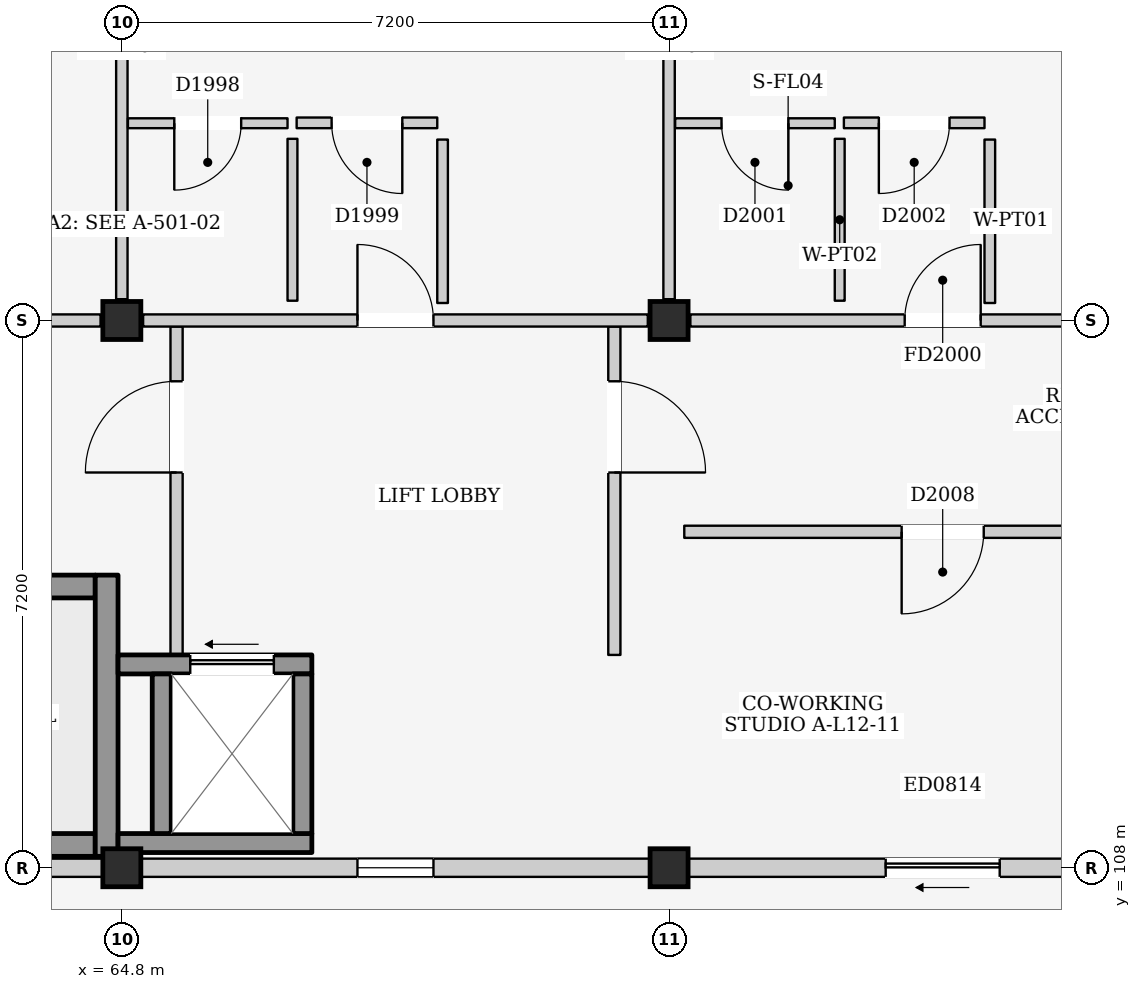
"""IFC4 building model, lengths in metres.
Left out: names, types, materials, properties, quantities, classifications, styles, units other than length and angle.
Written with IfcOpenShell. Run it as: python <this file> out.ifc"""

import sys

from ifc_helpers import new_model, si_unit, direction, frame, frame_2d, origin, origin_2d, place, context, subcontext, project, spatial, rectangle, extrude, element, fill, save


model = new_model("IFC4")
c1 = context("Model", 3, precision=1e-05, world=origin(), true_north=direction((0.0, 1.0)))
c2 = subcontext(c1, "Body", "Model", "MODEL_VIEW")
j1 = project(units=[si_unit("LENGTHUNIT", "METRE"), si_unit("PLANEANGLEUNIT", "RADIAN")], contexts=[c1])
p1 = place(None, origin())
s1 = spatial("IfcSite", under=j1, at=p1, CompositionType="ELEMENT")
p2 = place(p1, origin())
s2 = spatial("IfcBuilding", under=s1, at=p2, CompositionType="ELEMENT")
p3 = place(p2, frame((0.0, 0.0, 41.2)))
s3 = spatial("IfcBuildingStorey", under=s2, at=p3, CompositionType="ELEMENT", Elevation=41.2)
for number, where, z_axis, x_axis in (
    (1, (64.8, 108.0, 0.0), (0.0, 0.0, 1.0), (1.0, 0.0, 0.0)),
    (2, (64.8, 115.2, 0.0), (0.0, 0.0, 1.0), (1.0, 0.0, 0.0)),
    (3, (72.0, 108.0, 0.0), (0.0, 0.0, 1.0), (1.0, 0.0, 0.0)),
    (4, (72.0, 115.2, 0.0), (0.0, 0.0, 1.0), (1.0, 0.0, 0.0)),
):
    element("IfcColumn", number, at=place(p3, frame(where, z_axis=z_axis, x_axis=x_axis)), inside=s3, PredefinedType="COLUMN", context=c2, shape_type="SweptSolid", body=[
        extrude(rectangle(XDim=0.5, YDim=0.5, at=origin_2d()), origin(), (0.0, 0.0, 1.0), 3.2),
    ])
p4 = place(p3, frame((57.85, 108.0, 0.0), z_axis=(0.0, 0.0, 1.0), x_axis=(1.0, 0.0, 0.0)))
e5 = element("IfcWall", 5, at=p4, inside=s3, PredefinedType="ELEMENTEDWALL", context=c2, shape_type="SweptSolid", body=[
    extrude(rectangle(XDim=6.7, YDim=0.24, at=frame_2d((3.35, 0.0))), origin(), (0.0, 0.0, 1.0), 2.285),
])
p5 = place(p4, frame((2.85, 0.0, 1.2)))
e6 = element("IfcOpeningElement", 6, at=p5, cuts=e5, PredefinedType="OPENING", context=c2, shape_type="SweptSolid", body=[
    extrude(rectangle(XDim=1.0, YDim=0.9, at=frame_2d((0.5, 0.45))), frame((0.0, 0.135, 0.0), z_axis=(0.0, -1.0, 0.0), x_axis=(1.0, 0.0, 0.0)), (0.0, 0.0, 1.0), 0.27),
])
p6 = place(p3, frame((65.05, 108.0, 0.0), z_axis=(0.0, 0.0, 1.0), x_axis=(1.0, 0.0, 0.0)))
e7 = element("IfcWall", 7, at=p6, inside=s3, PredefinedType="ELEMENTEDWALL", context=c2, shape_type="SweptSolid", body=[
    extrude(rectangle(XDim=6.7, YDim=0.24, at=frame_2d((3.35, 0.0))), origin(), (0.0, 0.0, 1.0), 2.285),
])
p7 = place(p6, frame((2.85, 0.0, 1.2)))
e8 = element("IfcOpeningElement", 8, at=p7, cuts=e7, PredefinedType="OPENING", context=c2, shape_type="SweptSolid", body=[
    extrude(rectangle(XDim=1.0, YDim=0.9, at=frame_2d((0.5, 0.45))), frame((0.0, 0.135, 0.0), z_axis=(0.0, -1.0, 0.0), x_axis=(1.0, 0.0, 0.0)), (0.0, 0.0, 1.0), 0.27),
])
p8 = place(p3, frame((72.25, 108.0, 0.0), z_axis=(0.0, 0.0, 1.0), x_axis=(1.0, 0.0, 0.0)))
e9 = element("IfcWall", 9, at=p8, inside=s3, PredefinedType="ELEMENTEDWALL", context=c2, shape_type="SweptSolid", body=[
    extrude(rectangle(XDim=6.7, YDim=0.24, at=frame_2d((3.35, 0.0))), origin(), (0.0, 0.0, 1.0), 2.285),
])
p9 = place(p8, frame((2.6, 0.0, 0.0)))
e10 = element("IfcOpeningElement", 10, at=p9, cuts=e9, PredefinedType="OPENING", context=c2, shape_type="SweptSolid", body=[
    extrude(rectangle(XDim=1.5, YDim=2.12, at=frame_2d((0.75, 1.06))), frame((0.0, 0.135, 0.0), z_axis=(0.0, -1.0, 0.0), x_axis=(1.0, 0.0, 0.0)), (0.0, 0.0, 1.0), 0.27),
])
p10 = place(p3, frame((57.95, 108.3, 0.0), z_axis=(0.0, 0.0, 1.0), x_axis=(1.0, 0.0, 0.0)))
e11 = element("IfcWall", 11, at=p10, inside=s3, PredefinedType="SHEAR", context=c2, shape_type="SweptSolid", body=[
    extrude(rectangle(XDim=6.5, YDim=0.3, at=frame_2d((3.25, 0.0))), origin(), (0.0, 0.0, 1.0), 2.95),
])
p11 = place(p3, frame((57.95, 111.7, 0.0), z_axis=(0.0, 0.0, 1.0), x_axis=(1.0, 0.0, 0.0)))
e12 = element("IfcWall", 12, at=p11, inside=s3, PredefinedType="SHEAR", context=c2, shape_type="SweptSolid", body=[
    extrude(rectangle(XDim=6.5, YDim=0.3, at=frame_2d((3.25, 0.0))), origin(), (0.0, 0.0, 1.0), 2.95),
])
p12 = place(p11, frame((0.18, 0.0, 0.0)))
e13 = element("IfcOpeningElement", 13, at=p12, cuts=e12, PredefinedType="OPENING", context=c2, shape_type="SweptSolid", body=[
    extrude(rectangle(XDim=1.15, YDim=2.2, at=frame_2d((0.575, 1.1))), frame((0.0, 0.165, 0.0), z_axis=(0.0, -1.0, 0.0), x_axis=(1.0, 0.0, 0.0)), (0.0, 0.0, 1.0), 0.33),
])
p13 = place(p3, frame((64.6, 108.15, 0.0), z_axis=(0.0, 0.0, 1.0), x_axis=(0.0, 1.0, 0.0)))
e14 = element("IfcWall", 14, at=p13, inside=s3, PredefinedType="SHEAR", context=c2, shape_type="SweptSolid", body=[
    extrude(rectangle(XDim=3.7, YDim=0.3, at=frame_2d((1.85, 0.0))), origin(), (0.0, 0.0, 1.0), 2.95),
])
p14 = place(p3, frame((65.52, 110.8, 0.0), z_axis=(0.0, 0.0, 1.0), x_axis=(0.0, 1.0, 0.0)))
e15 = element("IfcWall", 15, at=p14, inside=s3, PredefinedType="PARTITIONING", context=c2, shape_type="SweptSolid", body=[
    extrude(rectangle(XDim=4.32, YDim=0.16, at=frame_2d((2.16, 0.0))), origin(), (0.0, 0.0, 1.0), 2.95),
])
p15 = place(p14, frame((2.4, 0.0, 0.0)))
e16 = element("IfcOpeningElement", 16, at=p15, cuts=e15, PredefinedType="OPENING", context=c2, shape_type="SweptSolid", body=[
    extrude(rectangle(XDim=1.2, YDim=2.2, at=frame_2d((0.6, 1.1))), frame((0.0, 0.095, 0.0), z_axis=(0.0, -1.0, 0.0), x_axis=(1.0, 0.0, 0.0)), (0.0, 0.0, 1.0), 0.19),
])
p16 = place(p3, frame((71.28, 110.8, 0.0), z_axis=(0.0, 0.0, 1.0), x_axis=(0.0, 1.0, 0.0)))
e17 = element("IfcWall", 17, at=p16, inside=s3, PredefinedType="PARTITIONING", context=c2, shape_type="SweptSolid", body=[
    extrude(rectangle(XDim=4.32, YDim=0.16, at=frame_2d((2.16, 0.0))), origin(), (0.0, 0.0, 1.0), 2.95),
])
p17 = place(p16, frame((2.4, 0.0, 0.0)))
e18 = element("IfcOpeningElement", 18, at=p17, cuts=e17, PredefinedType="OPENING", context=c2, shape_type="SweptSolid", body=[
    extrude(rectangle(XDim=1.2, YDim=2.2, at=frame_2d((0.6, 1.1))), frame((0.0, 0.095, 0.0), z_axis=(0.0, -1.0, 0.0), x_axis=(1.0, 0.0, 0.0)), (0.0, 0.0, 1.0), 0.19),
])
p18 = place(p3, frame((64.75, 108.325, 0.0), z_axis=(0.0, 0.0, 1.0), x_axis=(1.0, 0.0, 0.0)))
e19 = element("IfcWall", 19, at=p18, inside=s3, PredefinedType="SHEAR", context=c2, shape_type="SweptSolid", body=[
    extrude(rectangle(XDim=2.55, YDim=0.25, at=frame_2d((1.275, 0.0))), origin(), (0.0, 0.0, 1.0), 2.95),
])
p19 = place(p3, frame((64.75, 110.675, 0.0), z_axis=(0.0, 0.0, 1.0), x_axis=(1.0, 0.0, 0.0)))
e20 = element("IfcWall", 20, at=p19, inside=s3, PredefinedType="SHEAR", context=c2, shape_type="SweptSolid", body=[
    extrude(rectangle(XDim=2.55, YDim=0.25, at=frame_2d((1.275, 0.0))), origin(), (0.0, 0.0, 1.0), 2.95),
])
p20 = place(p19, frame((0.95, 0.0, 0.0)))
e21 = element("IfcOpeningElement", 21, at=p20, cuts=e20, PredefinedType="OPENING", context=c2, shape_type="SweptSolid", body=[
    extrude(rectangle(XDim=1.1, YDim=2.15, at=frame_2d((0.55, 1.075))), frame((0.0, 0.14, 0.0), z_axis=(0.0, -1.0, 0.0), x_axis=(1.0, 0.0, 0.0)), (0.0, 0.0, 1.0), 0.28),
])
for number, where, z_axis, x_axis in (
    (22, (65.325, 108.45, 0.0), (0.0, 0.0, 1.0), (0.0, 1.0, 0.0)),
    (23, (67.175, 108.45, 0.0), (0.0, 0.0, 1.0), (0.0, 1.0, 0.0)),
):
    element("IfcWall", number, at=place(p3, frame(where, z_axis=z_axis, x_axis=x_axis)), inside=s3, PredefinedType="SHEAR", context=c2, shape_type="SweptSolid", body=[
        extrude(rectangle(XDim=2.1, YDim=0.25, at=frame_2d((1.05, 0.0))), origin(), (0.0, 0.0, 1.0), 2.95),
    ])
p21 = place(p3, frame((57.88, 115.2, 0.0), z_axis=(0.0, 0.0, 1.0), x_axis=(1.0, 0.0, 0.0)))
e24 = element("IfcWall", 24, at=p21, inside=s3, PredefinedType="PARTITIONING", context=c2, shape_type="SweptSolid", body=[
    extrude(rectangle(XDim=6.64, YDim=0.16, at=frame_2d((3.32, 0.0))), origin(), (0.0, 0.0, 1.0), 2.285),
])
p22 = place(p21, frame((2.82, 0.0, 0.0)))
e25 = element("IfcOpeningElement", 25, at=p22, cuts=e24, PredefinedType="OPENING", context=c2, shape_type="SweptSolid", body=[
    extrude(rectangle(XDim=1.0, YDim=2.15, at=frame_2d((0.5, 1.075))), frame((0.0, 0.095, 0.0), z_axis=(0.0, -1.0, 0.0), x_axis=(1.0, 0.0, 0.0)), (0.0, 0.0, 1.0), 0.19),
])
p23 = place(p3, frame((64.8, 115.48, 0.0), z_axis=(0.0, 0.0, 1.0), x_axis=(0.0, 1.0, 0.0)))
e26 = element("IfcWall", 26, at=p23, inside=s3, PredefinedType="PARTITIONING", context=c2, shape_type="SweptSolid", body=[
    extrude(rectangle(XDim=6.64, YDim=0.15, at=frame_2d((3.32, 0.0))), origin(), (0.0, 0.0, 1.0), 2.435),
])
p24 = place(p3, frame((65.08, 115.2, 0.0), z_axis=(0.0, 0.0, 1.0), x_axis=(1.0, 0.0, 0.0)))
e27 = element("IfcWall", 27, at=p24, inside=s3, PredefinedType="PARTITIONING", context=c2, shape_type="SweptSolid", body=[
    extrude(rectangle(XDim=6.64, YDim=0.16, at=frame_2d((3.32, 0.0))), origin(), (0.0, 0.0, 1.0), 2.285),
])
p25 = place(p24, frame((2.82, 0.0, 0.0)))
e28 = element("IfcOpeningElement", 28, at=p25, cuts=e27, PredefinedType="OPENING", context=c2, shape_type="SweptSolid", body=[
    extrude(rectangle(XDim=1.0, YDim=2.15, at=frame_2d((0.5, 1.075))), frame((0.0, 0.095, 0.0), z_axis=(0.0, -1.0, 0.0), x_axis=(1.0, 0.0, 0.0)), (0.0, 0.0, 1.0), 0.19),
])
p26 = place(p3, frame((72.0, 115.48, 0.0), z_axis=(0.0, 0.0, 1.0), x_axis=(0.0, 1.0, 0.0)))
e29 = element("IfcWall", 29, at=p26, inside=s3, PredefinedType="PARTITIONING", context=c2, shape_type="SweptSolid", body=[
    extrude(rectangle(XDim=6.64, YDim=0.15, at=frame_2d((3.32, 0.0))), origin(), (0.0, 0.0, 1.0), 2.435),
])
p27 = place(p3, frame((64.88, 117.795, 0.0), z_axis=(0.0, 0.0, 1.0), x_axis=(1.0, 0.0, 0.0)))
e30 = element("IfcWall", 30, at=p27, inside=s3, PredefinedType="PARTITIONING", context=c2, shape_type="SweptSolid", body=[
    extrude(rectangle(XDim=2.1, YDim=0.13, at=frame_2d((1.05, 0.0))), origin(), (0.0, 0.0, 1.0), 2.95),
])
p28 = place(p27, frame((0.61, 0.0, 0.0)))
e31 = element("IfcOpeningElement", 31, at=p28, cuts=e30, PredefinedType="OPENING", context=c2, shape_type="SweptSolid", body=[
    extrude(rectangle(XDim=0.88, YDim=2.1, at=frame_2d((0.44, 1.05))), frame((0.0, 0.08, 0.0), z_axis=(0.0, -1.0, 0.0), x_axis=(1.0, 0.0, 0.0)), (0.0, 0.0, 1.0), 0.16),
])
p29 = place(p3, frame((67.045, 115.46, 0.0), z_axis=(0.0, 0.0, 1.0), x_axis=(0.0, 1.0, 0.0)))
e32 = element("IfcWall", 32, at=p29, inside=s3, PredefinedType="PARTITIONING", context=c2, shape_type="SweptSolid", body=[
    extrude(rectangle(XDim=2.13, YDim=0.13, at=frame_2d((1.065, 0.0))), origin(), (0.0, 0.0, 1.0), 2.95),
])
p30 = place(p3, frame((67.1, 117.8, 0.0), z_axis=(0.0, 0.0, 1.0), x_axis=(1.0, 0.0, 0.0)))
e33 = element("IfcWall", 33, at=p30, inside=s3, PredefinedType="PARTITIONING", context=c2, shape_type="SweptSolid", body=[
    extrude(rectangle(XDim=1.85, YDim=0.14, at=frame_2d((0.925, 0.0))), origin(), (0.0, 0.0, 1.0), 2.95),
])
p31 = place(p30, frame((0.46, 0.0, 0.0)))
e34 = element("IfcOpeningElement", 34, at=p31, cuts=e33, PredefinedType="OPENING", context=c2, shape_type="SweptSolid", body=[
    extrude(rectangle(XDim=0.93, YDim=2.14, at=frame_2d((0.465, 1.07))), frame((0.0, 0.085, 0.0), z_axis=(0.0, -1.0, 0.0), x_axis=(1.0, 0.0, 0.0)), (0.0, 0.0, 1.0), 0.17),
])
p32 = place(p3, frame((69.02, 115.43, 0.0), z_axis=(0.0, 0.0, 1.0), x_axis=(0.0, 1.0, 0.0)))
e35 = element("IfcWall", 35, at=p32, inside=s3, PredefinedType="PARTITIONING", context=c2, shape_type="SweptSolid", body=[
    extrude(rectangle(XDim=2.15, YDim=0.14, at=frame_2d((1.075, 0.0))), origin(), (0.0, 0.0, 1.0), 2.95),
])
p33 = place(p3, frame((72.28, 115.2, 0.0), z_axis=(0.0, 0.0, 1.0), x_axis=(1.0, 0.0, 0.0)))
e36 = element("IfcWall", 36, at=p33, inside=s3, PredefinedType="PARTITIONING", context=c2, shape_type="SweptSolid", body=[
    extrude(rectangle(XDim=6.64, YDim=0.16, at=frame_2d((3.32, 0.0))), origin(), (0.0, 0.0, 1.0), 2.285),
])
p34 = place(p33, frame((2.82, 0.0, 0.0)))
e37 = element("IfcOpeningElement", 37, at=p34, cuts=e36, PredefinedType="OPENING", context=c2, shape_type="SweptSolid", body=[
    extrude(rectangle(XDim=1.0, YDim=2.15, at=frame_2d((0.5, 1.075))), frame((0.0, 0.095, 0.0), z_axis=(0.0, -1.0, 0.0), x_axis=(1.0, 0.0, 0.0)), (0.0, 0.0, 1.0), 0.19),
])
p35 = place(p3, frame((72.08, 117.795, 0.0), z_axis=(0.0, 0.0, 1.0), x_axis=(1.0, 0.0, 0.0)))
e38 = element("IfcWall", 38, at=p35, inside=s3, PredefinedType="PARTITIONING", context=c2, shape_type="SweptSolid", body=[
    extrude(rectangle(XDim=2.1, YDim=0.13, at=frame_2d((1.05, 0.0))), origin(), (0.0, 0.0, 1.0), 2.95),
])
p36 = place(p35, frame((0.61, 0.0, 0.0)))
e39 = element("IfcOpeningElement", 39, at=p36, cuts=e38, PredefinedType="OPENING", context=c2, shape_type="SweptSolid", body=[
    extrude(rectangle(XDim=0.88, YDim=2.1, at=frame_2d((0.44, 1.05))), frame((0.0, 0.08, 0.0), z_axis=(0.0, -1.0, 0.0), x_axis=(1.0, 0.0, 0.0)), (0.0, 0.0, 1.0), 0.16),
])
p37 = place(p3, frame((74.245, 115.46, 0.0), z_axis=(0.0, 0.0, 1.0), x_axis=(0.0, 1.0, 0.0)))
e40 = element("IfcWall", 40, at=p37, inside=s3, PredefinedType="PARTITIONING", context=c2, shape_type="SweptSolid", body=[
    extrude(rectangle(XDim=2.13, YDim=0.13, at=frame_2d((1.065, 0.0))), origin(), (0.0, 0.0, 1.0), 2.95),
])
p38 = place(p3, frame((74.3, 117.8, 0.0), z_axis=(0.0, 0.0, 1.0), x_axis=(1.0, 0.0, 0.0)))
e41 = element("IfcWall", 41, at=p38, inside=s3, PredefinedType="PARTITIONING", context=c2, shape_type="SweptSolid", body=[
    extrude(rectangle(XDim=1.85, YDim=0.14, at=frame_2d((0.925, 0.0))), origin(), (0.0, 0.0, 1.0), 2.95),
])
p39 = place(p38, frame((0.46, 0.0, 0.0)))
e42 = element("IfcOpeningElement", 42, at=p39, cuts=e41, PredefinedType="OPENING", context=c2, shape_type="SweptSolid", body=[
    extrude(rectangle(XDim=0.93, YDim=2.14, at=frame_2d((0.465, 1.07))), frame((0.0, 0.085, 0.0), z_axis=(0.0, -1.0, 0.0), x_axis=(1.0, 0.0, 0.0)), (0.0, 0.0, 1.0), 0.17),
])
p40 = place(p3, frame((76.22, 115.43, 0.0), z_axis=(0.0, 0.0, 1.0), x_axis=(0.0, 1.0, 0.0)))
e43 = element("IfcWall", 43, at=p40, inside=s3, PredefinedType="PARTITIONING", context=c2, shape_type="SweptSolid", body=[
    extrude(rectangle(XDim=2.15, YDim=0.14, at=frame_2d((1.075, 0.0))), origin(), (0.0, 0.0, 1.0), 2.95),
])
p41 = place(p3, frame((72.2, 112.42, 0.0), z_axis=(0.0, 0.0, 1.0), x_axis=(1.0, 0.0, 0.0)))
e44 = element("IfcWall", 44, at=p41, inside=s3, PredefinedType="PARTITIONING", context=c2, shape_type="SweptSolid", body=[
    extrude(rectangle(XDim=6.8, YDim=0.16, at=frame_2d((3.4, 0.0))), origin(), (0.0, 0.0, 1.0), 2.95),
])
p42 = place(p41, frame((2.86, 0.0, 0.0)))
e45 = element("IfcOpeningElement", 45, at=p42, cuts=e44, PredefinedType="OPENING", context=c2, shape_type="SweptSolid", body=[
    extrude(rectangle(XDim=1.08, YDim=2.22, at=frame_2d((0.54, 1.11))), frame((0.0, 0.095, 0.0), z_axis=(0.0, -1.0, 0.0), x_axis=(1.0, 0.0, 0.0)), (0.0, 0.0, 1.0), 0.19),
])
p43 = place(p7, origin())
e46 = element("IfcWindow", 46, at=p43, inside=s3, PartitioningType="SINGLE_PANEL", PredefinedType="WINDOW", context=c2, shape_type="SweptSolid", body=[
    extrude(rectangle(XDim=1.0, YDim=0.9, at=frame_2d((0.5, 0.45))), frame((0.0, 0.03, 0.0), z_axis=(0.0, -1.0, 0.0), x_axis=(1.0, 0.0, 0.0)), (0.0, 0.0, 1.0), 0.06),
])
fill(e8, e46)
p44 = place(p9, frame((1.5, 0.0, 0.0), z_axis=(0.0, 0.0, 1.0), x_axis=(-1.0, 0.0, 0.0)))
e47 = element("IfcDoor", 47, at=p44, inside=s3, OperationType="SLIDING_TO_LEFT", PredefinedType="DOOR", context=c2, shape_type="SweptSolid", body=[
    extrude(rectangle(XDim=1.5, YDim=2.12, at=frame_2d((0.75, 1.06))), frame((0.0, 0.025, 0.0), z_axis=(0.0, -1.0, 0.0), x_axis=(1.0, 0.0, 0.0)), (0.0, 0.0, 1.0), 0.05),
])
fill(e10, e47)
p45 = place(p15, origin())
e48 = element("IfcDoor", 48, at=p45, inside=s3, OperationType="SINGLE_SWING_LEFT", PredefinedType="DOOR", context=c2, shape_type="SweptSolid", body=[
    extrude(rectangle(XDim=1.2, YDim=2.2, at=frame_2d((0.6, 1.1))), frame((0.0, 0.025, 0.0), z_axis=(0.0, -1.0, 0.0), x_axis=(1.0, 0.0, 0.0)), (0.0, 0.0, 1.0), 0.05),
])
fill(e16, e48)
p46 = place(p17, frame((1.2, 0.0, 0.0), z_axis=(0.0, 0.0, 1.0), x_axis=(-1.0, 0.0, 0.0)))
e49 = element("IfcDoor", 49, at=p46, inside=s3, OperationType="SINGLE_SWING_RIGHT", PredefinedType="DOOR", context=c2, shape_type="SweptSolid", body=[
    extrude(rectangle(XDim=1.2, YDim=2.2, at=frame_2d((0.6, 1.1))), frame((0.0, 0.025, 0.0), z_axis=(0.0, -1.0, 0.0), x_axis=(1.0, 0.0, 0.0)), (0.0, 0.0, 1.0), 0.05),
])
fill(e18, e49)
p47 = place(p20, origin())
e50 = element("IfcDoor", 50, at=p47, inside=s3, OperationType="SLIDING_TO_LEFT", PredefinedType="DOOR", context=c2, shape_type="SweptSolid", body=[
    extrude(rectangle(XDim=1.1, YDim=2.15, at=frame_2d((0.55, 1.075))), frame((0.0, 0.025, 0.0), z_axis=(0.0, -1.0, 0.0), x_axis=(1.0, 0.0, 0.0)), (0.0, 0.0, 1.0), 0.05),
])
fill(e21, e50)
p48 = place(p25, origin())
e51 = element("IfcDoor", 51, at=p48, inside=s3, OperationType="SINGLE_SWING_LEFT", PredefinedType="DOOR", context=c2, shape_type="SweptSolid", body=[
    extrude(rectangle(XDim=1.0, YDim=2.15, at=frame_2d((0.5, 1.075))), frame((0.0, 0.025, 0.0), z_axis=(0.0, -1.0, 0.0), x_axis=(1.0, 0.0, 0.0)), (0.0, 0.0, 1.0), 0.05),
])
fill(e28, e51)
p49 = place(p28, frame((0.88, 0.0, 0.0), z_axis=(0.0, 0.0, 1.0), x_axis=(-1.0, 0.0, 0.0)))
e52 = element("IfcDoor", 52, at=p49, inside=s3, OperationType="SINGLE_SWING_RIGHT", PredefinedType="DOOR", context=c2, shape_type="SweptSolid", body=[
    extrude(rectangle(XDim=0.88, YDim=2.1, at=frame_2d((0.44, 1.05))), frame((0.0, 0.025, 0.0), z_axis=(0.0, -1.0, 0.0), x_axis=(1.0, 0.0, 0.0)), (0.0, 0.0, 1.0), 0.05),
])
fill(e31, e52)
p50 = place(p31, frame((0.93, 0.0, 0.0), z_axis=(0.0, 0.0, 1.0), x_axis=(-1.0, 0.0, 0.0)))
e53 = element("IfcDoor", 53, at=p50, inside=s3, OperationType="SINGLE_SWING_LEFT", PredefinedType="DOOR", context=c2, shape_type="SweptSolid", body=[
    extrude(rectangle(XDim=0.93, YDim=2.14, at=frame_2d((0.465, 1.07))), frame((0.0, 0.025, 0.0), z_axis=(0.0, -1.0, 0.0), x_axis=(1.0, 0.0, 0.0)), (0.0, 0.0, 1.0), 0.05),
])
fill(e34, e53)
p51 = place(p34, origin())
e54 = element("IfcDoor", 54, at=p51, inside=s3, OperationType="SINGLE_SWING_RIGHT", PredefinedType="DOOR", context=c2, shape_type="SweptSolid", body=[
    extrude(rectangle(XDim=1.0, YDim=2.15, at=frame_2d((0.5, 1.075))), frame((0.0, 0.025, 0.0), z_axis=(0.0, -1.0, 0.0), x_axis=(1.0, 0.0, 0.0)), (0.0, 0.0, 1.0), 0.05),
])
fill(e37, e54)
p52 = place(p36, frame((0.88, 0.0, 0.0), z_axis=(0.0, 0.0, 1.0), x_axis=(-1.0, 0.0, 0.0)))
e55 = element("IfcDoor", 55, at=p52, inside=s3, OperationType="SINGLE_SWING_LEFT", PredefinedType="DOOR", context=c2, shape_type="SweptSolid", body=[
    extrude(rectangle(XDim=0.88, YDim=2.1, at=frame_2d((0.44, 1.05))), frame((0.0, 0.025, 0.0), z_axis=(0.0, -1.0, 0.0), x_axis=(1.0, 0.0, 0.0)), (0.0, 0.0, 1.0), 0.05),
])
fill(e39, e55)
p53 = place(p39, frame((0.93, 0.0, 0.0), z_axis=(0.0, 0.0, 1.0), x_axis=(-1.0, 0.0, 0.0)))
e56 = element("IfcDoor", 56, at=p53, inside=s3, OperationType="SINGLE_SWING_RIGHT", PredefinedType="DOOR", context=c2, shape_type="SweptSolid", body=[
    extrude(rectangle(XDim=0.93, YDim=2.14, at=frame_2d((0.465, 1.07))), frame((0.0, 0.025, 0.0), z_axis=(0.0, -1.0, 0.0), x_axis=(1.0, 0.0, 0.0)), (0.0, 0.0, 1.0), 0.05),
])
fill(e42, e56)
p54 = place(p42, frame((1.08, 0.0, 0.0), z_axis=(0.0, 0.0, 1.0), x_axis=(-1.0, 0.0, 0.0)))
e57 = element("IfcDoor", 57, at=p54, inside=s3, OperationType="SINGLE_SWING_RIGHT", PredefinedType="DOOR", context=c2, shape_type="SweptSolid", body=[
    extrude(rectangle(XDim=1.08, YDim=2.22, at=frame_2d((0.54, 1.11))), frame((0.0, 0.025, 0.0), z_axis=(0.0, -1.0, 0.0), x_axis=(1.0, 0.0, 0.0)), (0.0, 0.0, 1.0), 0.05),
])
fill(e45, e57)
save(model, sys.argv[1])
